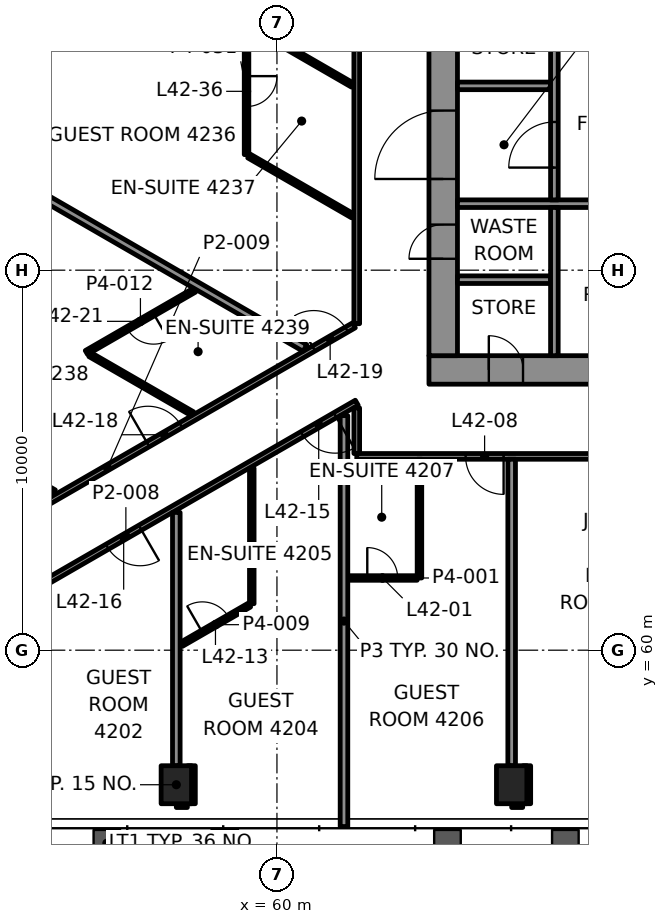
"""IFC4 building model, lengths in metres.
Left out: names, types, materials, properties, quantities, classifications, styles, units other than length and angle.
Written with IfcOpenShell. Run it as: python <this file> out.ifc"""

import sys

from ifc_helpers import new_model, si_unit, direction, frame, frame_2d, origin, origin_2d, place, context, subcontext, project, spatial, rectangle, hollow_rectangle, extrude, element, fill, save


model = new_model("IFC4")
c1 = context("Model", 3, precision=1e-05, world=origin(), true_north=direction((0.0, 1.0)))
c2 = subcontext(c1, "Body", "Model", "MODEL_VIEW")
j1 = project(units=[si_unit("LENGTHUNIT", "METRE"), si_unit("PLANEANGLEUNIT", "RADIAN")], contexts=[c1])
p1 = place(None, origin())
s1 = spatial("IfcSite", under=j1, at=p1, CompositionType="ELEMENT")
p2 = place(p1, origin())
s2 = spatial("IfcBuilding", under=s1, at=p2, CompositionType="ELEMENT")
p3 = place(p2, frame((0.0, 0.0, 183.1)))
s3 = spatial("IfcBuildingStorey", under=s2, at=p3, CompositionType="ELEMENT", Elevation=183.1)
for number, where, z_axis, x_axis in (
    (1, (57.352, 56.46, -0.0), (0.0, 0.0, 1.0), (1.0, 0.0, 0.0)),
    (2, (66.176, 56.46, -0.0), (0.0, 0.0, 1.0), (1.0, 0.0, 0.0)),
):
    element("IfcColumn", number, at=place(p3, frame(where, z_axis=z_axis, x_axis=x_axis)), inside=s3, PredefinedType="COLUMN", context=c2, shape_type="SweptSolid", body=[
        extrude(hollow_rectangle(XDim=0.8, YDim=1.0, WallThickness=0.05, at=origin_2d()), origin(), (0.0, 0.0, 1.0), 3.9),
    ])
p4 = place(p3, frame((64.0, 67.375, 0.0), z_axis=(0.0, 0.0, 1.0), x_axis=(1.0, 0.0, 0.0)))
e3 = element("IfcWall", 3, at=p4, inside=s3, PredefinedType="SHEAR", context=c2, shape_type="SweptSolid", body=[
    extrude(rectangle(XDim=22.0, YDim=0.75, at=frame_2d((11.0, 0.0))), origin(), (0.0, 0.0, 1.0), 3.7),
])
p5 = place(p4, frame((1.575, 0.0, 0.0)))
e4 = element("IfcOpeningElement", 4, at=p5, cuts=e3, PredefinedType="OPENING", context=c2, shape_type="SweptSolid", body=[
    extrude(rectangle(XDim=0.9, YDim=2.1, at=frame_2d((0.45, 1.05))), frame((0.0, 0.385, 0.0), z_axis=(0.0, -1.0, 0.0), x_axis=(1.0, 0.0, 0.0)), (0.0, 0.0, 1.0), 0.77),
])
p6 = place(p4, frame((4.425, 0.0, 0.0)))
e5 = element("IfcOpeningElement", 5, at=p6, cuts=e3, PredefinedType="OPENING", context=c2, shape_type="SweptSolid", body=[
    extrude(rectangle(XDim=0.9, YDim=2.1, at=frame_2d((0.45, 1.05))), frame((0.0, 0.385, 0.0), z_axis=(0.0, -1.0, 0.0), x_axis=(1.0, 0.0, 0.0)), (0.0, 0.0, 1.0), 0.77),
])
p7 = place(p3, frame((64.375, 67.75, 0.0), z_axis=(0.0, 0.0, 1.0), x_axis=(0.0, 1.0, 0.0)))
e6 = element("IfcWall", 6, at=p7, inside=s3, PredefinedType="SHEAR", context=c2, shape_type="SweptSolid", body=[
    extrude(rectangle(XDim=14.5, YDim=0.75, at=frame_2d((7.25, 0.0))), origin(), (0.0, 0.0, 1.0), 3.7),
])
p8 = place(p7, frame((4.65, 0.0, 0.0)))
e7 = element("IfcOpeningElement", 7, at=p8, cuts=e6, PredefinedType="OPENING", context=c2, shape_type="SweptSolid", body=[
    extrude(rectangle(XDim=1.8, YDim=2.1, at=frame_2d((0.9, 1.05))), frame((0.0, 0.385, 0.0), z_axis=(0.0, -1.0, 0.0), x_axis=(1.0, 0.0, 0.0)), (0.0, 0.0, 1.0), 0.77),
])
p9 = place(p7, frame((2.55, 0.0, 0.0)))
e8 = element("IfcOpeningElement", 8, at=p9, cuts=e6, PredefinedType="OPENING", context=c2, shape_type="SweptSolid", body=[
    extrude(rectangle(XDim=0.9, YDim=2.1, at=frame_2d((0.45, 1.05))), frame((0.0, 0.385, 0.0), z_axis=(0.0, -1.0, 0.0), x_axis=(1.0, 0.0, 0.0)), (0.0, 0.0, 1.0), 0.77),
])
p10 = place(p7, frame((10.35, 0.0, 0.0)))
e9 = element("IfcOpeningElement", 9, at=p10, cuts=e6, PredefinedType="OPENING", context=c2, shape_type="SweptSolid", body=[
    extrude(rectangle(XDim=0.9, YDim=2.1, at=frame_2d((0.45, 1.05))), frame((0.0, 0.385, 0.0), z_axis=(0.0, -1.0, 0.0), x_axis=(1.0, 0.0, 0.0)), (0.0, 0.0, 1.0), 0.77),
])
for number, where, z_axis, x_axis in (
    (10, (57.352, 55.96, 0.0), (0.0, 0.0, 1.0), (1.0, 0.0, 0.0)),
    (11, (66.176, 55.96, 0.0), (0.0, 0.0, 1.0), (1.0, 0.0, 0.0)),
):
    element("IfcWall", number, at=place(p3, frame(where, z_axis=z_axis, x_axis=x_axis)), inside=s3, PredefinedType="PARTITIONING", context=c2, shape_type="SweptSolid", body=[
        extrude(rectangle(XDim=0.29, YDim=0.2, at=frame_2d((0.145, 0.0))), origin(), (0.0, 0.0, 1.0), 3.1),
    ])
p11 = place(p3, frame((61.864, 61.9, 0.0), z_axis=(0.0, 0.0, 1.0), x_axis=(1.0, 0.0, 0.0)))
e12 = element("IfcWall", 12, at=p11, inside=s3, PredefinedType="PARTITIONING", context=c2, shape_type="SweptSolid", body=[
    extrude(rectangle(XDim=1.825, YDim=0.12, at=frame_2d((0.913, 0.0))), origin(), (0.0, 0.0, 1.0), 3.1),
])
p12 = place(p11, frame((0.513, 0.0, 0.0)))
e13 = element("IfcOpeningElement", 13, at=p12, cuts=e12, PredefinedType="OPENING", context=c2, shape_type="SweptSolid", body=[
    extrude(rectangle(XDim=0.8, YDim=2.1, at=frame_2d((0.4, 1.05))), frame((0.0, 0.07, 0.0), z_axis=(0.0, -1.0, 0.0), x_axis=(1.0, 0.0, 0.0)), (0.0, 0.0, 1.0), 0.14),
])
p13 = place(p3, frame((87.9, 65.1, 0.0), z_axis=(0.0, 0.0, 1.0), x_axis=(-1.0, 0.0, 0.0)))
e14 = element("IfcWall", 14, at=p13, inside=s3, PredefinedType="PARTITIONING", context=c2, shape_type="SweptSolid", body=[
    extrude(rectangle(XDim=25.8, YDim=0.15, at=frame_2d((12.9, 0.0))), origin(), (0.0, 0.0, 1.0), 3.1),
])
p14 = place(p13, frame((2.264, 0.0, 0.0)))
e15 = element("IfcOpeningElement", 15, at=p14, cuts=e14, PredefinedType="OPENING", context=c2, shape_type="SweptSolid", body=[
    extrude(rectangle(XDim=1.0, YDim=2.1, at=frame_2d((0.5, 1.05))), frame((0.0, 0.085, 0.0), z_axis=(0.0, -1.0, 0.0), x_axis=(1.0, 0.0, 0.0)), (0.0, 0.0, 1.0), 0.17),
])
p15 = place(p13, frame((10.244, 0.0, 0.0)))
e16 = element("IfcOpeningElement", 16, at=p15, cuts=e14, PredefinedType="OPENING", context=c2, shape_type="SweptSolid", body=[
    extrude(rectangle(XDim=0.9, YDim=2.1, at=frame_2d((0.45, 1.05))), frame((0.0, 0.085, 0.0), z_axis=(0.0, -1.0, 0.0), x_axis=(1.0, 0.0, 0.0)), (0.0, 0.0, 1.0), 0.17),
])
p16 = place(p13, frame((18.135, 0.0, 0.0)))
e17 = element("IfcOpeningElement", 17, at=p16, cuts=e14, PredefinedType="OPENING", context=c2, shape_type="SweptSolid", body=[
    extrude(rectangle(XDim=1.0, YDim=2.1, at=frame_2d((0.5, 1.05))), frame((0.0, 0.085, 0.0), z_axis=(0.0, -1.0, 0.0), x_axis=(1.0, 0.0, 0.0)), (0.0, 0.0, 1.0), 0.17),
])
p17 = place(p13, frame((21.936, 0.0, 0.0)))
e18 = element("IfcOpeningElement", 18, at=p17, cuts=e14, PredefinedType="OPENING", context=c2, shape_type="SweptSolid", body=[
    extrude(rectangle(XDim=1.0, YDim=2.1, at=frame_2d((0.5, 1.05))), frame((0.0, 0.085, 0.0), z_axis=(0.0, -1.0, 0.0), x_axis=(1.0, 0.0, 0.0)), (0.0, 0.0, 1.0), 0.17),
])
p18 = place(p3, frame((57.487, 60.155, 0.0), z_axis=(0.0, 0.0, 1.0), x_axis=(0.866018462269, 0.500012022864, 0.0)))
e19 = element("IfcWall", 19, at=p18, inside=s3, PredefinedType="PARTITIONING", context=c2, shape_type="SweptSolid", body=[
    extrude(rectangle(XDim=2.068, YDim=0.12, at=frame_2d((1.034, 0.0))), origin(), (0.0, 0.0, 1.0), 3.1),
])
p19 = place(p18, frame((0.634, 0.0, 0.0)))
e20 = element("IfcOpeningElement", 20, at=p19, cuts=e19, PredefinedType="OPENING", context=c2, shape_type="SweptSolid", body=[
    extrude(rectangle(XDim=0.8, YDim=2.1, at=frame_2d((0.4, 1.05))), frame((0.0, 0.07, 0.0), z_axis=(0.0, -1.0, 0.0), x_axis=(1.0, 0.0, 0.0)), (0.0, 0.0, 1.0), 0.14),
])
p20 = place(p3, frame((62.1, 66.513, 0.0), z_axis=(0.0, 0.0, 1.0), x_axis=(-0.866025334814, -0.500000119461, 0.0)))
e21 = element("IfcWall", 21, at=p20, inside=s3, PredefinedType="PARTITIONING", context=c2, shape_type="SweptSolid", body=[
    extrude(rectangle(XDim=14.03, YDim=0.15, at=frame_2d((7.015, 0.0))), origin(), (0.0, 0.0, 1.0), 2.947),
])
p21 = place(p20, frame((0.656, 0.0, 0.0)))
e22 = element("IfcOpeningElement", 22, at=p21, cuts=e21, PredefinedType="OPENING", context=c2, shape_type="SweptSolid", body=[
    extrude(rectangle(XDim=1.0, YDim=2.1, at=frame_2d((0.5, 1.05))), frame((0.0, 0.085, 0.0), z_axis=(0.0, -1.0, 0.0), x_axis=(1.0, 0.0, 0.0)), (0.0, 0.0, 1.0), 0.17),
])
p22 = place(p20, frame((6.582, 0.0, 0.0)))
e23 = element("IfcOpeningElement", 23, at=p22, cuts=e21, PredefinedType="OPENING", context=c2, shape_type="SweptSolid", body=[
    extrude(rectangle(XDim=1.0, YDim=2.1, at=frame_2d((0.5, 1.05))), frame((0.0, 0.085, 0.0), z_axis=(0.0, -1.0, 0.0), x_axis=(1.0, 0.0, 0.0)), (0.0, 0.0, 1.0), 0.17),
])
p23 = place(p3, frame((49.05, 61.057, 0.0), z_axis=(0.0, 0.0, 1.0), x_axis=(0.866027379905, 0.499996577244, 0.0)))
e24 = element("IfcWall", 24, at=p23, inside=s3, PredefinedType="PARTITIONING", context=c2, shape_type="SweptSolid", body=[
    extrude(rectangle(XDim=14.982, YDim=0.15, at=frame_2d((7.491, 0.0))), origin(), (0.0, 0.0, 1.0), 3.1),
])
p24 = place(p23, frame((0.532, 0.0, 0.0)))
e25 = element("IfcOpeningElement", 25, at=p24, cuts=e24, PredefinedType="OPENING", context=c2, shape_type="SweptSolid", body=[
    extrude(rectangle(XDim=1.0, YDim=2.1, at=frame_2d((0.5, 1.05))), frame((0.0, 0.085, 0.0), z_axis=(0.0, -1.0, 0.0), x_axis=(1.0, 0.0, 0.0)), (0.0, 0.0, 1.0), 0.17),
])
p25 = place(p23, frame((8.725, 0.0, 0.0)))
e26 = element("IfcOpeningElement", 26, at=p25, cuts=e24, PredefinedType="OPENING", context=c2, shape_type="SweptSolid", body=[
    extrude(rectangle(XDim=1.0, YDim=2.1, at=frame_2d((0.5, 1.05))), frame((0.0, 0.085, 0.0), z_axis=(0.0, -1.0, 0.0), x_axis=(1.0, 0.0, 0.0)), (0.0, 0.0, 1.0), 0.17),
])
p26 = place(p23, frame((13.76, 0.0, 0.0)))
e27 = element("IfcOpeningElement", 27, at=p26, cuts=e24, PredefinedType="OPENING", context=c2, shape_type="SweptSolid", body=[
    extrude(rectangle(XDim=1.0, YDim=2.1, at=frame_2d((0.5, 1.05))), frame((0.0, 0.085, 0.0), z_axis=(0.0, -1.0, 0.0), x_axis=(1.0, 0.0, 0.0)), (0.0, 0.0, 1.0), 0.17),
])
p27 = place(p3, frame((57.83, 69.475, 0.0), z_axis=(0.0, 0.0, 1.0), x_axis=(-0.866038236991, -0.499977771575, 0.0)))
e28 = element("IfcWall", 28, at=p27, inside=s3, PredefinedType="PARTITIONING", context=c2, shape_type="SweptSolid", body=[
    extrude(rectangle(XDim=3.283, YDim=0.12, at=frame_2d((1.642, 0.0))), origin(), (0.0, 0.0, 1.0), 3.1),
])
p28 = place(p27, frame((1.242, 0.0, 0.0)))
e29 = element("IfcOpeningElement", 29, at=p28, cuts=e28, PredefinedType="OPENING", context=c2, shape_type="SweptSolid", body=[
    extrude(rectangle(XDim=0.8, YDim=2.1, at=frame_2d((0.4, 1.05))), frame((0.0, 0.07, 0.0), z_axis=(0.0, -1.0, 0.0), x_axis=(1.0, 0.0, 0.0)), (0.0, 0.0, 1.0), 0.14),
])
p29 = place(p3, frame((66.576, 55.96, 0.0), z_axis=(0.0, 0.0, 1.0), x_axis=(0.0, 1.0, 0.0)))
e30 = element("IfcWall", 30, at=p29, inside=s3, PredefinedType="PARTITIONING", context=c2, shape_type="SweptSolid", body=[
    extrude(rectangle(XDim=1.0, YDim=0.2, at=frame_2d((0.5, 0.0))), origin(), (0.0, 0.0, 1.0), 3.022),
])
p30 = place(p3, frame((66.176, 56.96, 0.0), z_axis=(0.0, 0.0, 1.0), x_axis=(0.0, 1.0, 0.0)))
e31 = element("IfcWall", 31, at=p30, inside=s3, PredefinedType="PARTITIONING", context=c2, shape_type="SweptSolid", body=[
    extrude(rectangle(XDim=8.065, YDim=0.2, at=frame_2d((4.033, 0.0))), origin(), (0.0, 0.0, 1.0), 3.1),
])
p31 = place(p3, frame((63.75, 61.9, 0.0), z_axis=(0.0, 0.0, 1.0), x_axis=(0.0, 1.0, 0.0)))
e32 = element("IfcWall", 32, at=p31, inside=s3, PredefinedType="PARTITIONING", context=c2, shape_type="SweptSolid", body=[
    extrude(rectangle(XDim=3.125, YDim=0.12, at=frame_2d((1.562, 0.0))), origin(), (0.0, 0.0, 1.0), 3.1),
])
p32 = place(p3, frame((62.1, 65.175, 0.0), z_axis=(0.0, 0.0, 1.0), x_axis=(0.0, 1.0, 0.0)))
e33 = element("IfcWall", 33, at=p32, inside=s3, PredefinedType="PARTITIONING", context=c2, shape_type="SweptSolid", body=[
    extrude(rectangle(XDim=1.201, YDim=0.15, at=frame_2d((0.601, 0.0))), origin(), (0.0, 0.0, 1.0), 2.947),
])
p33 = place(p3, frame((62.1, 68.591, 0.0), z_axis=(0.0, 0.0, 1.0), x_axis=(0.0, 1.0, 0.0)))
e34 = element("IfcWall", 34, at=p33, inside=s3, PredefinedType="PARTITIONING", context=c2, shape_type="SweptSolid", body=[
    extrude(rectangle(XDim=16.308, YDim=0.15, at=frame_2d((8.154, 0.0))), origin(), (0.0, 0.0, 1.0), 3.1),
])
p34 = place(p3, frame((61.764, 55.36, 0.0), z_axis=(0.0, 0.0, 1.0), x_axis=(0.0, 1.0, 0.0)))
e35 = element("IfcWall", 35, at=p34, inside=s3, PredefinedType="PARTITIONING", context=c2, shape_type="SweptSolid", body=[
    extrude(rectangle(XDim=10.813, YDim=0.2, at=frame_2d((5.406, 0.0))), origin(), (0.0, 0.0, 1.0), 2.947),
])
p35 = place(p3, frame((59.338, 61.223, 0.0), z_axis=(0.0, 0.0, 1.0), x_axis=(0.0, 1.0, 0.0)))
e36 = element("IfcWall", 36, at=p35, inside=s3, PredefinedType="PARTITIONING", context=c2, shape_type="SweptSolid", body=[
    extrude(rectangle(XDim=3.568, YDim=0.12, at=frame_2d((1.784, 0.0))), origin(), (0.0, 0.0, 1.0), 2.947),
])
p36 = place(p3, frame((59.2, 76.371, 0.0), z_axis=(0.0, 0.0, 1.0), x_axis=(0.0, -1.0, 0.0)))
e37 = element("IfcWall", 37, at=p36, inside=s3, PredefinedType="PARTITIONING", context=c2, shape_type="SweptSolid", body=[
    extrude(rectangle(XDim=3.329, YDim=0.12, at=frame_2d((1.665, 0.0))), origin(), (0.0, 0.0, 1.0), 3.1),
])
p37 = place(p36, frame((1.265, 0.0, 0.0)))
e38 = element("IfcOpeningElement", 38, at=p37, cuts=e37, PredefinedType="OPENING", context=c2, shape_type="SweptSolid", body=[
    extrude(rectangle(XDim=0.8, YDim=2.1, at=frame_2d((0.4, 1.05))), frame((0.0, 0.07, 0.0), z_axis=(0.0, -1.0, 0.0), x_axis=(1.0, 0.0, 0.0)), (0.0, 0.0, 1.0), 0.14),
])
p38 = place(p3, frame((57.752, 55.96, 0.0), z_axis=(0.0, 0.0, 1.0), x_axis=(0.0, 1.0, 0.0)))
e39 = element("IfcWall", 39, at=p38, inside=s3, PredefinedType="PARTITIONING", context=c2, shape_type="SweptSolid", body=[
    extrude(rectangle(XDim=1.0, YDim=0.2, at=frame_2d((0.5, 0.0))), origin(), (0.0, 0.0, 1.0), 3.022),
])
p39 = place(p3, frame((57.352, 56.96, 0.0), z_axis=(0.0, 0.0, 1.0), x_axis=(0.0, 1.0, 0.0)))
e40 = element("IfcWall", 40, at=p39, inside=s3, PredefinedType="PARTITIONING", context=c2, shape_type="SweptSolid", body=[
    extrude(rectangle(XDim=6.666, YDim=0.2, at=frame_2d((3.333, 0.0))), origin(), (0.0, 0.0, 1.0), 3.1),
])
p40 = place(p3, frame((61.99, 74.869, 0.0), z_axis=(0.0, 0.0, 1.0), x_axis=(-0.866017924271, 0.500012954673, 0.0)))
e41 = element("IfcWall", 41, at=p40, inside=s3, PredefinedType="PARTITIONING", context=c2, shape_type="SweptSolid", body=[
    extrude(rectangle(XDim=8.439, YDim=0.12, at=frame_2d((4.219, 0.0))), origin(), (0.0, 0.0, 1.0), 3.022),
])
p41 = place(p3, frame((61.99, 71.431, 0.0), z_axis=(0.0, 0.0, 1.0), x_axis=(-0.866028267601, 0.499995039691, 0.0)))
e42 = element("IfcWall", 42, at=p41, inside=s3, PredefinedType="PARTITIONING", context=c2, shape_type="SweptSolid", body=[
    extrude(rectangle(XDim=3.153, YDim=0.12, at=frame_2d((1.576, 0.0))), origin(), (0.0, 0.0, 1.0), 3.1),
])
p42 = place(p3, frame((60.737, 67.951, 0.0), z_axis=(0.0, 0.0, 1.0), x_axis=(-0.866033683985, 0.499985657998, 0.0)))
e43 = element("IfcWall", 43, at=p42, inside=s3, PredefinedType="PARTITIONING", context=c2, shape_type="SweptSolid", body=[
    extrude(rectangle(XDim=10.813, YDim=0.2, at=frame_2d((5.406, 0.0))), origin(), (0.0, 0.0, 1.0), 3.022),
])
p43 = place(p3, frame((57.776, 66.222, 0.0), z_axis=(0.0, 0.0, 1.0), x_axis=(-0.866009247561, 0.500027982357, 0.0)))
e44 = element("IfcWall", 44, at=p43, inside=s3, PredefinedType="PARTITIONING", context=c2, shape_type="SweptSolid", body=[
    extrude(rectangle(XDim=3.113, YDim=0.12, at=frame_2d((1.556, 0.0))), origin(), (0.0, 0.0, 1.0), 3.1),
])
p44 = place(p3, frame((54.119, 64.13, 0.0), z_axis=(0.0, 0.0, 1.0), x_axis=(-0.866016957496, 0.500014629116, 0.0)))
e45 = element("IfcWall", 45, at=p44, inside=s3, PredefinedType="PARTITIONING", context=c2, shape_type="SweptSolid", body=[
    extrude(rectangle(XDim=6.992, YDim=0.2, at=frame_2d((3.496, 0.0))), origin(), (0.0, 0.0, 1.0), 3.1),
])
p45 = place(p3, frame((64.75, 69.75, 0.0), z_axis=(0.0, 0.0, 1.0), x_axis=(1.0, 0.0, 0.0)))
e46 = element("IfcWall", 46, at=p45, inside=s3, PredefinedType="PARTITIONING", context=c2, shape_type="SweptSolid", body=[
    extrude(rectangle(XDim=2.45, YDim=0.2, at=frame_2d((1.225, 0.0))), origin(), (0.0, 0.0, 1.0), 3.7),
])
p46 = place(p3, frame((64.75, 71.75, 0.0), z_axis=(0.0, 0.0, 1.0), x_axis=(1.0, 0.0, 0.0)))
e47 = element("IfcWall", 47, at=p46, inside=s3, PredefinedType="PARTITIONING", context=c2, shape_type="SweptSolid", body=[
    extrude(rectangle(XDim=5.55, YDim=0.2, at=frame_2d((2.775, 0.0))), origin(), (0.0, 0.0, 1.0), 3.7),
])
p47 = place(p3, frame((64.75, 74.85, 0.0), z_axis=(0.0, 0.0, 1.0), x_axis=(1.0, 0.0, 0.0)))
e48 = element("IfcWall", 48, at=p47, inside=s3, PredefinedType="PARTITIONING", context=c2, shape_type="SweptSolid", body=[
    extrude(rectangle(XDim=2.45, YDim=0.2, at=frame_2d((1.225, 0.0))), origin(), (0.0, 0.0, 1.0), 3.7),
])
p48 = place(p3, frame((67.3, 67.75, 0.0), z_axis=(0.0, 0.0, 1.0), x_axis=(0.0, 1.0, 0.0)))
e49 = element("IfcWall", 49, at=p48, inside=s3, PredefinedType="PARTITIONING", context=c2, shape_type="SweptSolid", body=[
    extrude(rectangle(XDim=3.9, YDim=0.2, at=frame_2d((1.95, 0.0))), origin(), (0.0, 0.0, 1.0), 3.7),
])
p49 = place(p3, frame((67.3, 71.85, 0.0), z_axis=(0.0, 0.0, 1.0), x_axis=(0.0, 1.0, 0.0)))
e50 = element("IfcWall", 50, at=p49, inside=s3, PredefinedType="PARTITIONING", context=c2, shape_type="SweptSolid", body=[
    extrude(rectangle(XDim=5.75, YDim=0.2, at=frame_2d((2.875, 0.0))), origin(), (0.0, 0.0, 1.0), 3.7),
])
p50 = place(p49, frame((0.85, 0.0, 0.0)))
e51 = element("IfcOpeningElement", 51, at=p50, cuts=e50, PredefinedType="OPENING", context=c2, shape_type="SweptSolid", body=[
    extrude(rectangle(XDim=1.2, YDim=2.1, at=frame_2d((0.6, 1.05))), frame((0.0, 0.11, 0.0), z_axis=(0.0, -1.0, 0.0), x_axis=(1.0, 0.0, 0.0)), (0.0, 0.0, 1.0), 0.22),
])
p51 = place(p12, origin())
e52 = element("IfcDoor", 52, at=p51, inside=s3, OperationType="SINGLE_SWING_RIGHT", PredefinedType="DOOR", context=c2, shape_type="SweptSolid", body=[
    extrude(rectangle(XDim=0.8, YDim=2.1, at=frame_2d((0.4, 1.05))), frame((0.0, 0.025, 0.0), z_axis=(0.0, -1.0, 0.0), x_axis=(1.0, 0.0, 0.0)), (0.0, 0.0, 1.0), 0.05),
])
fill(e13, e52)
p52 = place(p17, origin())
e53 = element("IfcDoor", 53, at=p52, inside=s3, OperationType="SINGLE_SWING_RIGHT", PredefinedType="DOOR", context=c2, shape_type="SweptSolid", body=[
    extrude(rectangle(XDim=1.0, YDim=2.1, at=frame_2d((0.5, 1.05))), frame((0.0, 0.025, 0.0), z_axis=(0.0, -1.0, 0.0), x_axis=(1.0, 0.0, 0.0)), (0.0, 0.0, 1.0), 0.05),
])
fill(e18, e53)
p53 = place(p19, origin())
e54 = element("IfcDoor", 54, at=p53, inside=s3, OperationType="SINGLE_SWING_RIGHT", PredefinedType="DOOR", context=c2, shape_type="SweptSolid", body=[
    extrude(rectangle(XDim=0.8, YDim=2.1, at=frame_2d((0.4, 1.05))), frame((0.0, 0.025, 0.0), z_axis=(0.0, -1.0, 0.0), x_axis=(1.0, 0.0, 0.0)), (0.0, 0.0, 1.0), 0.05),
])
fill(e20, e54)
p54 = place(p21, origin())
e55 = element("IfcDoor", 55, at=p54, inside=s3, OperationType="SINGLE_SWING_RIGHT", PredefinedType="DOOR", context=c2, shape_type="SweptSolid", body=[
    extrude(rectangle(XDim=1.0, YDim=2.1, at=frame_2d((0.5, 1.05))), frame((0.0, 0.025, 0.0), z_axis=(0.0, -1.0, 0.0), x_axis=(1.0, 0.0, 0.0)), (0.0, 0.0, 1.0), 0.05),
])
fill(e22, e55)
p55 = place(p22, origin())
e56 = element("IfcDoor", 56, at=p55, inside=s3, OperationType="SINGLE_SWING_RIGHT", PredefinedType="DOOR", context=c2, shape_type="SweptSolid", body=[
    extrude(rectangle(XDim=1.0, YDim=2.1, at=frame_2d((0.5, 1.05))), frame((0.0, 0.025, 0.0), z_axis=(0.0, -1.0, 0.0), x_axis=(1.0, 0.0, 0.0)), (0.0, 0.0, 1.0), 0.05),
])
fill(e23, e56)
p56 = place(p25, origin())
e57 = element("IfcDoor", 57, at=p56, inside=s3, OperationType="SINGLE_SWING_LEFT", PredefinedType="DOOR", context=c2, shape_type="SweptSolid", body=[
    extrude(rectangle(XDim=1.0, YDim=2.1, at=frame_2d((0.5, 1.05))), frame((0.0, 0.025, 0.0), z_axis=(0.0, -1.0, 0.0), x_axis=(1.0, 0.0, 0.0)), (0.0, 0.0, 1.0), 0.05),
])
fill(e26, e57)
p57 = place(p26, origin())
e58 = element("IfcDoor", 58, at=p57, inside=s3, OperationType="SINGLE_SWING_LEFT", PredefinedType="DOOR", context=c2, shape_type="SweptSolid", body=[
    extrude(rectangle(XDim=1.0, YDim=2.1, at=frame_2d((0.5, 1.05))), frame((0.0, 0.025, 0.0), z_axis=(0.0, -1.0, 0.0), x_axis=(1.0, 0.0, 0.0)), (0.0, 0.0, 1.0), 0.05),
])
fill(e27, e58)
p58 = place(p28, origin())
e59 = element("IfcDoor", 59, at=p58, inside=s3, OperationType="SINGLE_SWING_LEFT", PredefinedType="DOOR", context=c2, shape_type="SweptSolid", body=[
    extrude(rectangle(XDim=0.8, YDim=2.1, at=frame_2d((0.4, 1.05))), frame((0.0, 0.025, 0.0), z_axis=(0.0, -1.0, 0.0), x_axis=(1.0, 0.0, 0.0)), (0.0, 0.0, 1.0), 0.05),
])
fill(e29, e59)
p59 = place(p37, origin())
e60 = element("IfcDoor", 60, at=p59, inside=s3, OperationType="SINGLE_SWING_LEFT", PredefinedType="DOOR", context=c2, shape_type="SweptSolid", body=[
    extrude(rectangle(XDim=0.8, YDim=2.1, at=frame_2d((0.4, 1.05))), frame((0.0, 0.025, 0.0), z_axis=(0.0, -1.0, 0.0), x_axis=(1.0, 0.0, 0.0)), (0.0, 0.0, 1.0), 0.05),
])
fill(e38, e60)
p60 = place(p3, origin())
p61 = place(p60, frame((51.471, 55.315, 0.15), z_axis=(0.0, 0.0, 1.0), x_axis=(1.0, 0.0, 0.0)))
p62 = place(p61, origin())
e61 = element("IfcWindow", 61, at=p62, inside=s3, PartitioningType="SINGLE_PANEL", PredefinedType="WINDOW", context=c2, shape_type="SweptSolid", body=[
    extrude(rectangle(XDim=2.866, YDim=3.55, at=frame_2d((1.433, 1.775))), frame((0.0, 0.03, 0.0), z_axis=(0.0, -1.0, 0.0), x_axis=(1.0, 0.0, 0.0)), (0.0, 0.0, 1.0), 0.06),
])
p63 = place(p50, origin())
e62 = element("IfcDoor", 62, at=p63, inside=s3, OperationType="SINGLE_SWING_RIGHT", PredefinedType="DOOR", context=c2, shape_type="SweptSolid", body=[
    extrude(rectangle(XDim=1.2, YDim=2.1, at=frame_2d((0.6, 1.05))), frame((0.0, 0.025, 0.0), z_axis=(0.0, -1.0, 0.0), x_axis=(1.0, 0.0, 0.0)), (0.0, 0.0, 1.0), 0.05),
])
fill(e51, e62)
p64 = place(p8, origin())
e63 = element("IfcDoor", 63, at=p64, inside=s3, OperationType="SINGLE_SWING_LEFT", PredefinedType="DOOR", context=c2, shape_type="SweptSolid", body=[
    extrude(rectangle(XDim=1.8, YDim=2.1, at=frame_2d((0.9, 1.05))), frame((0.0, 0.095, 0.0), z_axis=(0.0, -1.0, 0.0), x_axis=(1.0, 0.0, 0.0)), (0.0, 0.0, 1.0), 0.19),
])
fill(e7, e63)
p65 = place(p5, origin())
e64 = element("IfcDoor", 64, at=p65, inside=s3, OperationType="SINGLE_SWING_LEFT", PredefinedType="DOOR", context=c2, shape_type="SweptSolid", body=[
    extrude(rectangle(XDim=0.9, YDim=2.1, at=frame_2d((0.45, 1.05))), frame((0.0, 0.095, 0.0), z_axis=(0.0, -1.0, 0.0), x_axis=(1.0, 0.0, 0.0)), (0.0, 0.0, 1.0), 0.19),
])
fill(e4, e64)
p66 = place(p9, origin())
e65 = element("IfcDoor", 65, at=p66, inside=s3, OperationType="SINGLE_SWING_RIGHT", PredefinedType="DOOR", context=c2, shape_type="SweptSolid", body=[
    extrude(rectangle(XDim=0.9, YDim=2.1, at=frame_2d((0.45, 1.05))), frame((0.0, 0.095, 0.0), z_axis=(0.0, -1.0, 0.0), x_axis=(1.0, 0.0, 0.0)), (0.0, 0.0, 1.0), 0.19),
])
fill(e8, e65)
save(model, sys.argv[1])
